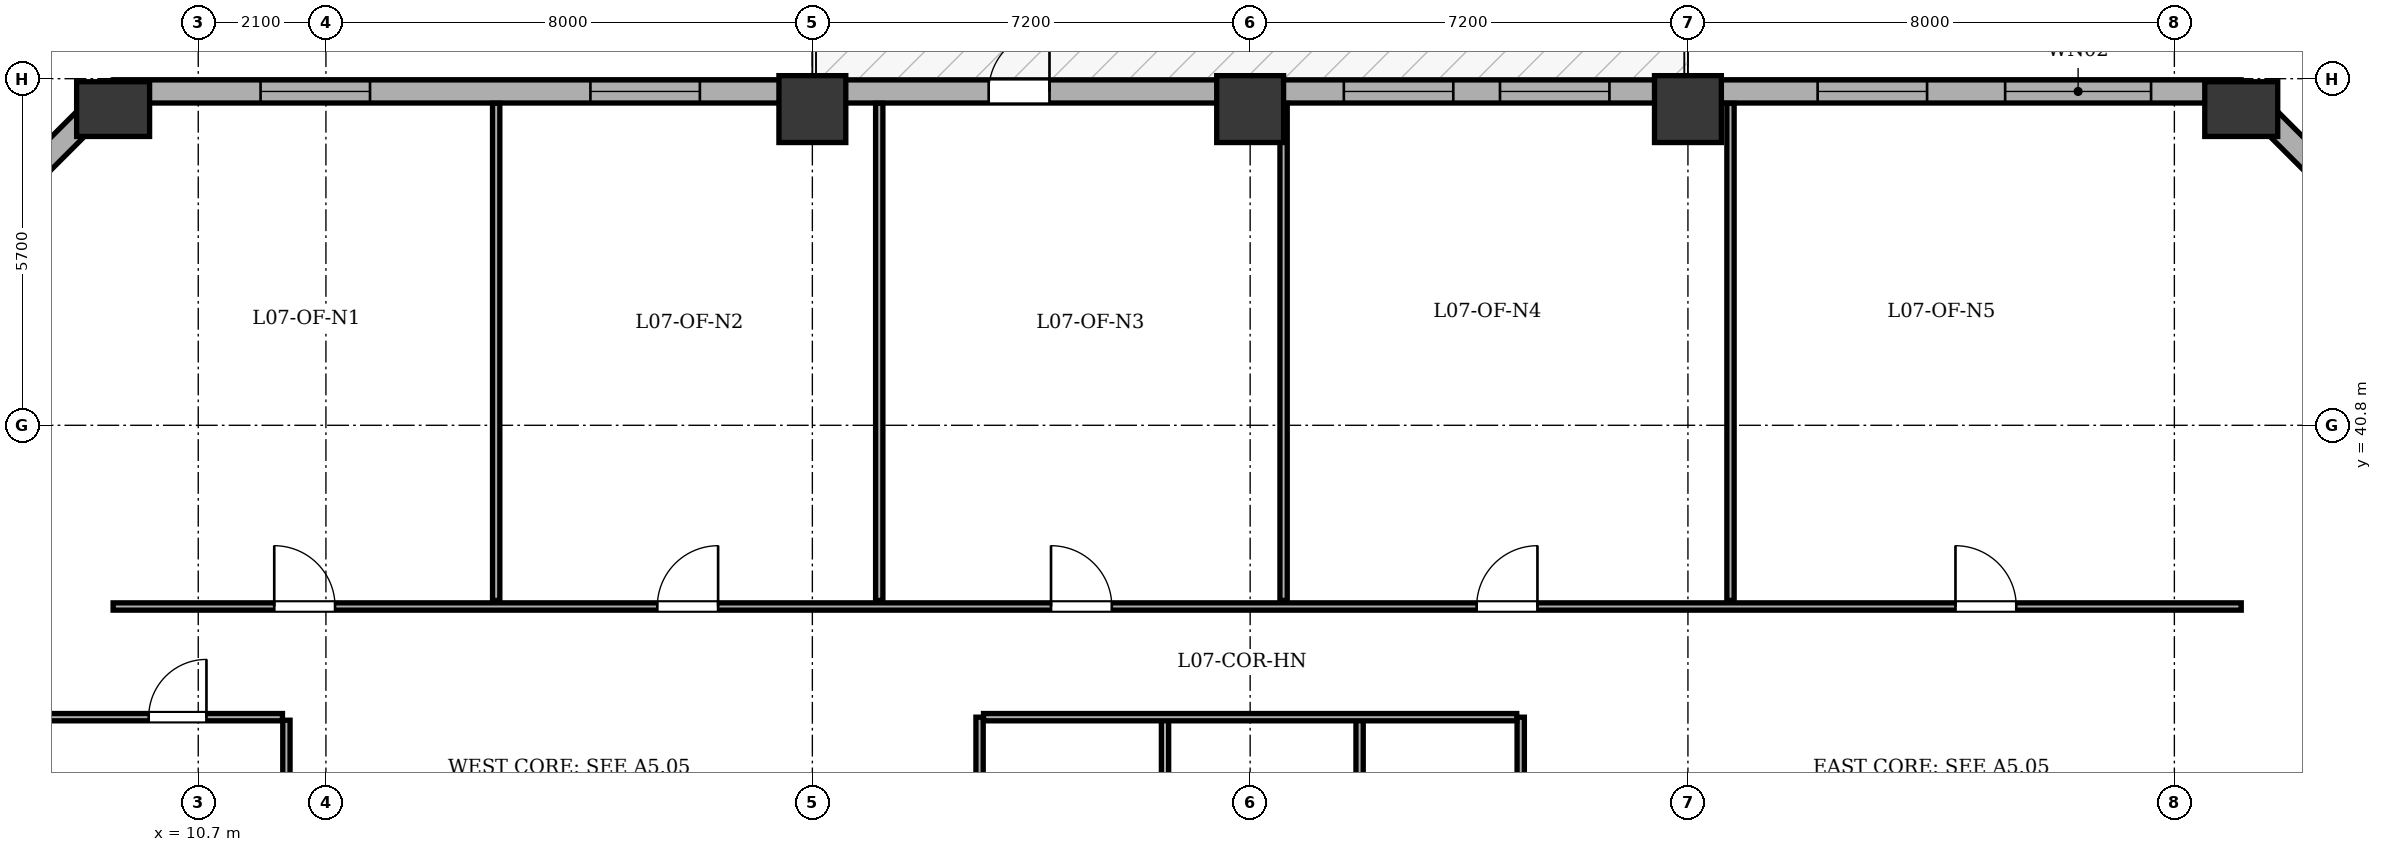
"""IFC4 building model, lengths in metres.
Left out: names, types, materials, properties, quantities, classifications, styles, units other than length and angle.
Written with IfcOpenShell. Run it as: python <this file> out.ifc"""

import sys

from ifc_helpers import new_model, si_unit, direction, frame, frame_2d, origin, origin_2d, place, context, subcontext, project, spatial, rectangle, extrude, element, fill, save


model = new_model("IFC4")
c1 = context("Model", 3, precision=1e-05, world=origin(), true_north=direction((0.0, 1.0)))
c2 = subcontext(c1, "Body", "Model", "MODEL_VIEW")
j1 = project(units=[si_unit("LENGTHUNIT", "METRE"), si_unit("PLANEANGLEUNIT", "RADIAN")], contexts=[c1])
p1 = place(None, origin())
s1 = spatial("IfcSite", under=j1, at=p1, CompositionType="ELEMENT")
p2 = place(p1, origin())
s2 = spatial("IfcBuilding", under=s1, at=p2, CompositionType="ELEMENT")
p3 = place(p2, frame((0.0, 0.0, 32.1)))
s3 = spatial("IfcBuildingStorey", under=s2, at=p3, CompositionType="ELEMENT", Elevation=32.1)
p4 = place(p3, frame((9.3, 46.0, 0.0), z_axis=(0.0, 0.0, 1.0), x_axis=(1.0, 0.0, 0.0)))
e1 = element("IfcColumn", 1, at=p4, inside=s3, PredefinedType="COLUMN", context=c2, shape_type="SweptSolid", body=[
    extrude(rectangle(XDim=0.9, YDim=1.2, at=origin_2d()), origin(), (0.0, 0.0, 1.0), 3.9),
])
for number, where, z_axis, x_axis in (
    (2, (20.8, 46.0, 0.0), (0.0, 0.0, 1.0), (1.0, 0.0, 0.0)),
    (3, (28.0, 46.0, 0.0), (0.0, 0.0, 1.0), (1.0, 0.0, 0.0)),
    (4, (35.2, 46.0, 0.0), (0.0, 0.0, 1.0), (1.0, 0.0, 0.0)),
):
    element("IfcColumn", number, at=place(p3, frame(where, z_axis=z_axis, x_axis=x_axis)), inside=s3, PredefinedType="COLUMN", context=c2, shape_type="SweptSolid", body=[
        extrude(rectangle(XDim=1.1, YDim=1.1, at=origin_2d()), origin(), (0.0, 0.0, 1.0), 3.9),
    ])
p5 = place(p3, frame((44.3, 46.0, 0.0), z_axis=(0.0, 0.0, 1.0), x_axis=(1.0, 0.0, 0.0)))
e5 = element("IfcColumn", 5, at=p5, inside=s3, PredefinedType="COLUMN", context=c2, shape_type="SweptSolid", body=[
    extrude(rectangle(XDim=0.9, YDim=1.2, at=origin_2d()), origin(), (0.0, 0.0, 1.0), 3.9),
])
p6 = place(p3, frame((4.51, 41.5, 0.0), z_axis=(0.0, 0.0, 1.0), x_axis=(0.707106781187, 0.707106781187, 0.0)))
e6 = element("IfcWall", 6, at=p6, inside=s3, PredefinedType="STANDARD", context=c2, shape_type="SweptSolid", body=[
    extrude(rectangle(XDim=6.774, YDim=0.38, at=frame_2d((3.387, 0.0))), origin(), (0.0, 0.0, 1.0), 3.135),
])
p7 = place(p6, frame((2.687, 0.0, 0.8)))
e7 = element("IfcOpeningElement", 7, at=p7, cuts=e6, PredefinedType="OPENING", context=c2, shape_type="SweptSolid", body=[
    extrude(rectangle(XDim=1.4, YDim=1.65, at=frame_2d((0.7, 0.825))), frame((0.0, 0.2, 0.0), z_axis=(0.0, -1.0, 0.0), x_axis=(1.0, 0.0, 0.0)), (0.0, 0.0, 1.0), 0.4),
])
p8 = place(p3, frame((9.3, 46.29, 0.0), z_axis=(0.0, 0.0, 1.0), x_axis=(1.0, 0.0, 0.0)))
e8 = element("IfcWall", 8, at=p8, inside=s3, PredefinedType="STANDARD", context=c2, shape_type="SweptSolid", body=[
    extrude(rectangle(XDim=35.0, YDim=0.38, at=frame_2d((17.5, 0.0))), origin(), (0.0, 0.0, 1.0), 3.135),
])
p9 = place(p8, frame((14.4, 0.0, 0.0)))
e9 = element("IfcOpeningElement", 9, at=p9, cuts=e8, PredefinedType="OPENING", context=c2, shape_type="SweptSolid", body=[
    extrude(rectangle(XDim=1.0, YDim=2.02, at=frame_2d((0.5, 1.01))), frame((0.0, 0.2, 0.0), z_axis=(0.0, -1.0, 0.0), x_axis=(1.0, 0.0, 0.0)), (0.0, 0.0, 1.0), 0.4),
])
p10 = place(p8, frame((2.425, 0.0, 0.8)))
e10 = element("IfcOpeningElement", 10, at=p10, cuts=e8, PredefinedType="OPENING", context=c2, shape_type="SweptSolid", body=[
    extrude(rectangle(XDim=1.8, YDim=1.9, at=frame_2d((0.9, 0.95))), frame((0.0, 0.2, 0.0), z_axis=(0.0, -1.0, 0.0), x_axis=(1.0, 0.0, 0.0)), (0.0, 0.0, 1.0), 0.4),
])
p11 = place(p8, frame((7.85, 0.0, 0.8)))
e11 = element("IfcOpeningElement", 11, at=p11, cuts=e8, PredefinedType="OPENING", context=c2, shape_type="SweptSolid", body=[
    extrude(rectangle(XDim=1.8, YDim=1.9, at=frame_2d((0.9, 0.95))), frame((0.0, 0.2, 0.0), z_axis=(0.0, -1.0, 0.0), x_axis=(1.0, 0.0, 0.0)), (0.0, 0.0, 1.0), 0.4),
])
p12 = place(p8, frame((20.241, 0.0, 0.8)))
e12 = element("IfcOpeningElement", 12, at=p12, cuts=e8, PredefinedType="OPENING", context=c2, shape_type="SweptSolid", body=[
    extrude(rectangle(XDim=1.8, YDim=1.9, at=frame_2d((0.9, 0.95))), frame((0.0, 0.2, 0.0), z_axis=(0.0, -1.0, 0.0), x_axis=(1.0, 0.0, 0.0)), (0.0, 0.0, 1.0), 0.4),
])
p13 = place(p8, frame((22.809, 0.0, 0.8)))
e13 = element("IfcOpeningElement", 13, at=p13, cuts=e8, PredefinedType="OPENING", context=c2, shape_type="SweptSolid", body=[
    extrude(rectangle(XDim=1.8, YDim=1.9, at=frame_2d((0.9, 0.95))), frame((0.0, 0.2, 0.0), z_axis=(0.0, -1.0, 0.0), x_axis=(1.0, 0.0, 0.0)), (0.0, 0.0, 1.0), 0.4),
])
p14 = place(p8, frame((28.033, 0.0, 0.8)))
e14 = element("IfcOpeningElement", 14, at=p14, cuts=e8, PredefinedType="OPENING", context=c2, shape_type="SweptSolid", body=[
    extrude(rectangle(XDim=1.8, YDim=1.9, at=frame_2d((0.9, 0.95))), frame((0.0, 0.2, 0.0), z_axis=(0.0, -1.0, 0.0), x_axis=(1.0, 0.0, 0.0)), (0.0, 0.0, 1.0), 0.4),
])
p15 = place(p8, frame((31.117, 0.0, 0.8)))
e15 = element("IfcOpeningElement", 15, at=p15, cuts=e8, PredefinedType="OPENING", context=c2, shape_type="SweptSolid", body=[
    extrude(rectangle(XDim=2.4, YDim=1.9, at=frame_2d((1.2, 0.95))), frame((0.0, 0.2, 0.0), z_axis=(0.0, -1.0, 0.0), x_axis=(1.0, 0.0, 0.0)), (0.0, 0.0, 1.0), 0.4),
])
p16 = place(p3, frame((44.3, 46.29, 0.0), z_axis=(0.0, 0.0, 1.0), x_axis=(0.707106781187, -0.707106781187, 0.0)))
e16 = element("IfcWall", 16, at=p16, inside=s3, PredefinedType="STANDARD", context=c2, shape_type="SweptSolid", body=[
    extrude(rectangle(XDim=6.774, YDim=0.38, at=frame_2d((3.387, 0.0))), origin(), (0.0, 0.0, 1.0), 3.135),
])
p17 = place(p16, frame((2.687, 0.0, 0.8)))
e17 = element("IfcOpeningElement", 17, at=p17, cuts=e16, PredefinedType="OPENING", context=c2, shape_type="SweptSolid", body=[
    extrude(rectangle(XDim=1.4, YDim=1.65, at=frame_2d((0.7, 0.825))), frame((0.0, 0.2, 0.0), z_axis=(0.0, -1.0, 0.0), x_axis=(1.0, 0.0, 0.0)), (0.0, 0.0, 1.0), 0.4),
])
for number, where, z_axis, x_axis in (
    (18, (23.55, 24.715, 0.0), (0.0, 0.0, 1.0), (0.0, 1.0, 0.0)),
    (19, (32.45, 24.715, 0.0), (0.0, 0.0, 1.0), (0.0, 1.0, 0.0)),
    (20, (26.6, 24.715, 0.0), (0.0, 0.0, 1.0), (0.0, 1.0, 0.0)),
):
    element("IfcWall", number, at=place(p3, frame(where, z_axis=z_axis, x_axis=x_axis)), inside=s3, PredefinedType="PARTITIONING", context=c2, shape_type="SweptSolid", body=[
        extrude(rectangle(XDim=11.285, YDim=0.12, at=frame_2d((5.643, 0.0))), origin(), (0.0, 0.0, 1.0), 3.6),
    ])
p18 = place(p3, frame((29.8, 24.715, 0.0), z_axis=(0.0, 0.0, 1.0), x_axis=(0.0, 1.0, 0.0)))
e21 = element("IfcWall", 21, at=p18, inside=s3, PredefinedType="PARTITIONING", context=c2, shape_type="SweptSolid", body=[
    extrude(rectangle(XDim=11.285, YDim=0.12, at=frame_2d((5.643, 0.0))), origin(), (0.0, 0.0, 1.0), 3.135),
])
p19 = place(p3, frame((23.615, 36.0, 0.0), z_axis=(0.0, 0.0, 1.0), x_axis=(1.0, 0.0, 0.0)))
e22 = element("IfcWall", 22, at=p19, inside=s3, PredefinedType="PARTITIONING", context=c2, shape_type="SweptSolid", body=[
    extrude(rectangle(XDim=8.77, YDim=0.12, at=frame_2d((4.385, 0.0))), origin(), (0.0, 0.0, 1.0), 3.6),
])
p20 = place(p3, frame((9.3, 37.82, 0.0), z_axis=(0.0, 0.0, 1.0), x_axis=(1.0, 0.0, 0.0)))
e23 = element("IfcWall", 23, at=p20, inside=s3, PredefinedType="PARTITIONING", context=c2, shape_type="SweptSolid", body=[
    extrude(rectangle(XDim=35.0, YDim=0.12, at=frame_2d((17.5, 0.0))), origin(), (0.0, 0.0, 1.0), 3.6),
])
p21 = place(p20, frame((2.65, 0.0, 0.0)))
e24 = element("IfcOpeningElement", 24, at=p21, cuts=e23, PredefinedType="OPENING", context=c2, shape_type="SweptSolid", body=[
    extrude(rectangle(XDim=1.0, YDim=2.1, at=frame_2d((0.5, 1.05))), frame((0.0, 0.07, 0.0), z_axis=(0.0, -1.0, 0.0), x_axis=(1.0, 0.0, 0.0)), (0.0, 0.0, 1.0), 0.14),
])
p22 = place(p20, frame((8.95, 0.0, 0.0)))
e25 = element("IfcOpeningElement", 25, at=p22, cuts=e23, PredefinedType="OPENING", context=c2, shape_type="SweptSolid", body=[
    extrude(rectangle(XDim=1.0, YDim=2.1, at=frame_2d((0.5, 1.05))), frame((0.0, 0.07, 0.0), z_axis=(0.0, -1.0, 0.0), x_axis=(1.0, 0.0, 0.0)), (0.0, 0.0, 1.0), 0.14),
])
p23 = place(p20, frame((15.425, 0.0, 0.0)))
e26 = element("IfcOpeningElement", 26, at=p23, cuts=e23, PredefinedType="OPENING", context=c2, shape_type="SweptSolid", body=[
    extrude(rectangle(XDim=1.0, YDim=2.1, at=frame_2d((0.5, 1.05))), frame((0.0, 0.07, 0.0), z_axis=(0.0, -1.0, 0.0), x_axis=(1.0, 0.0, 0.0)), (0.0, 0.0, 1.0), 0.14),
])
p24 = place(p20, frame((22.425, 0.0, 0.0)))
e27 = element("IfcOpeningElement", 27, at=p24, cuts=e23, PredefinedType="OPENING", context=c2, shape_type="SweptSolid", body=[
    extrude(rectangle(XDim=1.0, YDim=2.1, at=frame_2d((0.5, 1.05))), frame((0.0, 0.07, 0.0), z_axis=(0.0, -1.0, 0.0), x_axis=(1.0, 0.0, 0.0)), (0.0, 0.0, 1.0), 0.14),
])
p25 = place(p20, frame((30.3, 0.0, 0.0)))
e28 = element("IfcOpeningElement", 28, at=p25, cuts=e23, PredefinedType="OPENING", context=c2, shape_type="SweptSolid", body=[
    extrude(rectangle(XDim=1.0, YDim=2.1, at=frame_2d((0.5, 1.05))), frame((0.0, 0.07, 0.0), z_axis=(0.0, -1.0, 0.0), x_axis=(1.0, 0.0, 0.0)), (0.0, 0.0, 1.0), 0.14),
])
for number, where, z_axis, x_axis in (
    (29, (15.6, 37.92, 0.0), (0.0, 0.0, 1.0), (0.0, 1.0, 0.0)),
    (30, (21.9, 37.92, 0.0), (0.0, 0.0, 1.0), (0.0, 1.0, 0.0)),
    (31, (28.55, 37.92, 0.0), (0.0, 0.0, 1.0), (0.0, 1.0, 0.0)),
    (32, (35.9, 37.92, 0.0), (0.0, 0.0, 1.0), (0.0, 1.0, 0.0)),
):
    element("IfcWall", number, at=place(p3, frame(where, z_axis=z_axis, x_axis=x_axis)), inside=s3, PredefinedType="PARTITIONING", context=c2, shape_type="SweptSolid", body=[
        extrude(rectangle(XDim=8.175, YDim=0.12, at=frame_2d((4.087, 0.0))), origin(), (0.0, 0.0, 1.0), 3.6),
    ])
p26 = place(p3, frame((12.15, 18.45, 0.0), z_axis=(0.0, 0.0, 1.0), x_axis=(0.0, 1.0, 0.0)))
e33 = element("IfcWall", 33, at=p26, inside=s3, PredefinedType="PARTITIONING", context=c2, shape_type="SweptSolid", body=[
    extrude(rectangle(XDim=17.5, YDim=0.12, at=frame_2d((8.75, 0.0))), origin(), (0.0, 0.0, 1.0), 3.6),
])
p27 = place(p3, frame((4.705, 36.0, 0.0), z_axis=(0.0, 0.0, 1.0), x_axis=(1.0, 0.0, 0.0)))
e34 = element("IfcWall", 34, at=p27, inside=s3, PredefinedType="PARTITIONING", context=c2, shape_type="SweptSolid", body=[
    extrude(rectangle(XDim=7.38, YDim=0.12, at=frame_2d((3.69, 0.0))), origin(), (0.0, 0.0, 1.0), 3.6),
])
p28 = place(p27, frame((5.18, 0.0, 0.0)))
e35 = element("IfcOpeningElement", 35, at=p28, cuts=e34, PredefinedType="OPENING", context=c2, shape_type="SweptSolid", body=[
    extrude(rectangle(XDim=0.95, YDim=2.1, at=frame_2d((0.475, 1.05))), frame((0.0, 0.07, 0.0), z_axis=(0.0, -1.0, 0.0), x_axis=(1.0, 0.0, 0.0)), (0.0, 0.0, 1.0), 0.14),
])
p29 = place(p9, origin())
e36 = element("IfcDoor", 36, at=p29, inside=s3, OperationType="SINGLE_SWING_RIGHT", PredefinedType="DOOR", context=c2, shape_type="SweptSolid", body=[
    extrude(rectangle(XDim=1.0, YDim=2.02, at=frame_2d((0.5, 1.01))), frame((0.0, 0.025, 0.0), z_axis=(0.0, -1.0, 0.0), x_axis=(1.0, 0.0, 0.0)), (0.0, 0.0, 1.0), 0.05),
])
fill(e9, e36)
p30 = place(p10, origin())
e37 = element("IfcWindow", 37, at=p30, inside=s3, PartitioningType="SINGLE_PANEL", PredefinedType="WINDOW", context=c2, shape_type="SweptSolid", body=[
    extrude(rectangle(XDim=1.8, YDim=1.9, at=frame_2d((0.9, 0.95))), frame((0.0, -0.01, 0.0), z_axis=(0.0, -1.0, 0.0), x_axis=(1.0, 0.0, 0.0)), (0.0, 0.0, 1.0), 0.06),
])
fill(e10, e37)
p31 = place(p11, origin())
e38 = element("IfcWindow", 38, at=p31, inside=s3, PartitioningType="SINGLE_PANEL", PredefinedType="WINDOW", context=c2, shape_type="SweptSolid", body=[
    extrude(rectangle(XDim=1.8, YDim=1.9, at=frame_2d((0.9, 0.95))), frame((0.0, -0.01, 0.0), z_axis=(0.0, -1.0, 0.0), x_axis=(1.0, 0.0, 0.0)), (0.0, 0.0, 1.0), 0.06),
])
fill(e11, e38)
p32 = place(p12, origin())
e39 = element("IfcWindow", 39, at=p32, inside=s3, PartitioningType="SINGLE_PANEL", PredefinedType="WINDOW", context=c2, shape_type="SweptSolid", body=[
    extrude(rectangle(XDim=1.8, YDim=1.9, at=frame_2d((0.9, 0.95))), frame((0.0, -0.01, 0.0), z_axis=(0.0, -1.0, 0.0), x_axis=(1.0, 0.0, 0.0)), (0.0, 0.0, 1.0), 0.06),
])
fill(e12, e39)
p33 = place(p13, origin())
e40 = element("IfcWindow", 40, at=p33, inside=s3, PartitioningType="SINGLE_PANEL", PredefinedType="WINDOW", context=c2, shape_type="SweptSolid", body=[
    extrude(rectangle(XDim=1.8, YDim=1.9, at=frame_2d((0.9, 0.95))), frame((0.0, -0.01, 0.0), z_axis=(0.0, -1.0, 0.0), x_axis=(1.0, 0.0, 0.0)), (0.0, 0.0, 1.0), 0.06),
])
fill(e13, e40)
p34 = place(p14, origin())
e41 = element("IfcWindow", 41, at=p34, inside=s3, PartitioningType="SINGLE_PANEL", PredefinedType="WINDOW", context=c2, shape_type="SweptSolid", body=[
    extrude(rectangle(XDim=1.8, YDim=1.9, at=frame_2d((0.9, 0.95))), frame((0.0, -0.01, 0.0), z_axis=(0.0, -1.0, 0.0), x_axis=(1.0, 0.0, 0.0)), (0.0, 0.0, 1.0), 0.06),
])
fill(e14, e41)
p35 = place(p15, origin())
e42 = element("IfcWindow", 42, at=p35, inside=s3, PartitioningType="SINGLE_PANEL", PredefinedType="WINDOW", context=c2, shape_type="SweptSolid", body=[
    extrude(rectangle(XDim=2.4, YDim=1.9, at=frame_2d((1.2, 0.95))), frame((0.0, -0.01, 0.0), z_axis=(0.0, -1.0, 0.0), x_axis=(1.0, 0.0, 0.0)), (0.0, 0.0, 1.0), 0.06),
])
fill(e15, e42)
p36 = place(p21, origin())
e43 = element("IfcDoor", 43, at=p36, inside=s3, OperationType="SINGLE_SWING_LEFT", PredefinedType="DOOR", context=c2, shape_type="SweptSolid", body=[
    extrude(rectangle(XDim=1.0, YDim=2.1, at=frame_2d((0.5, 1.05))), frame((0.0, 0.025, 0.0), z_axis=(0.0, -1.0, 0.0), x_axis=(1.0, 0.0, 0.0)), (0.0, 0.0, 1.0), 0.05),
])
fill(e24, e43)
p37 = place(p22, origin())
e44 = element("IfcDoor", 44, at=p37, inside=s3, OperationType="SINGLE_SWING_RIGHT", PredefinedType="DOOR", context=c2, shape_type="SweptSolid", body=[
    extrude(rectangle(XDim=1.0, YDim=2.1, at=frame_2d((0.5, 1.05))), frame((0.0, 0.025, 0.0), z_axis=(0.0, -1.0, 0.0), x_axis=(1.0, 0.0, 0.0)), (0.0, 0.0, 1.0), 0.05),
])
fill(e25, e44)
p38 = place(p23, origin())
e45 = element("IfcDoor", 45, at=p38, inside=s3, OperationType="SINGLE_SWING_LEFT", PredefinedType="DOOR", context=c2, shape_type="SweptSolid", body=[
    extrude(rectangle(XDim=1.0, YDim=2.1, at=frame_2d((0.5, 1.05))), frame((0.0, 0.025, 0.0), z_axis=(0.0, -1.0, 0.0), x_axis=(1.0, 0.0, 0.0)), (0.0, 0.0, 1.0), 0.05),
])
fill(e26, e45)
p39 = place(p24, origin())
e46 = element("IfcDoor", 46, at=p39, inside=s3, OperationType="SINGLE_SWING_RIGHT", PredefinedType="DOOR", context=c2, shape_type="SweptSolid", body=[
    extrude(rectangle(XDim=1.0, YDim=2.1, at=frame_2d((0.5, 1.05))), frame((0.0, 0.025, 0.0), z_axis=(0.0, -1.0, 0.0), x_axis=(1.0, 0.0, 0.0)), (0.0, 0.0, 1.0), 0.05),
])
fill(e27, e46)
p40 = place(p25, origin())
e47 = element("IfcDoor", 47, at=p40, inside=s3, OperationType="SINGLE_SWING_LEFT", PredefinedType="DOOR", context=c2, shape_type="SweptSolid", body=[
    extrude(rectangle(XDim=1.0, YDim=2.1, at=frame_2d((0.5, 1.05))), frame((0.0, 0.025, 0.0), z_axis=(0.0, -1.0, 0.0), x_axis=(1.0, 0.0, 0.0)), (0.0, 0.0, 1.0), 0.05),
])
fill(e28, e47)
p41 = place(p28, origin())
e48 = element("IfcDoor", 48, at=p41, inside=s3, OperationType="SINGLE_SWING_RIGHT", PredefinedType="DOOR", context=c2, shape_type="SweptSolid", body=[
    extrude(rectangle(XDim=0.95, YDim=2.1, at=frame_2d((0.475, 1.05))), frame((0.0, 0.025, 0.0), z_axis=(0.0, -1.0, 0.0), x_axis=(1.0, 0.0, 0.0)), (0.0, 0.0, 1.0), 0.05),
])
fill(e35, e48)
save(model, sys.argv[1])
